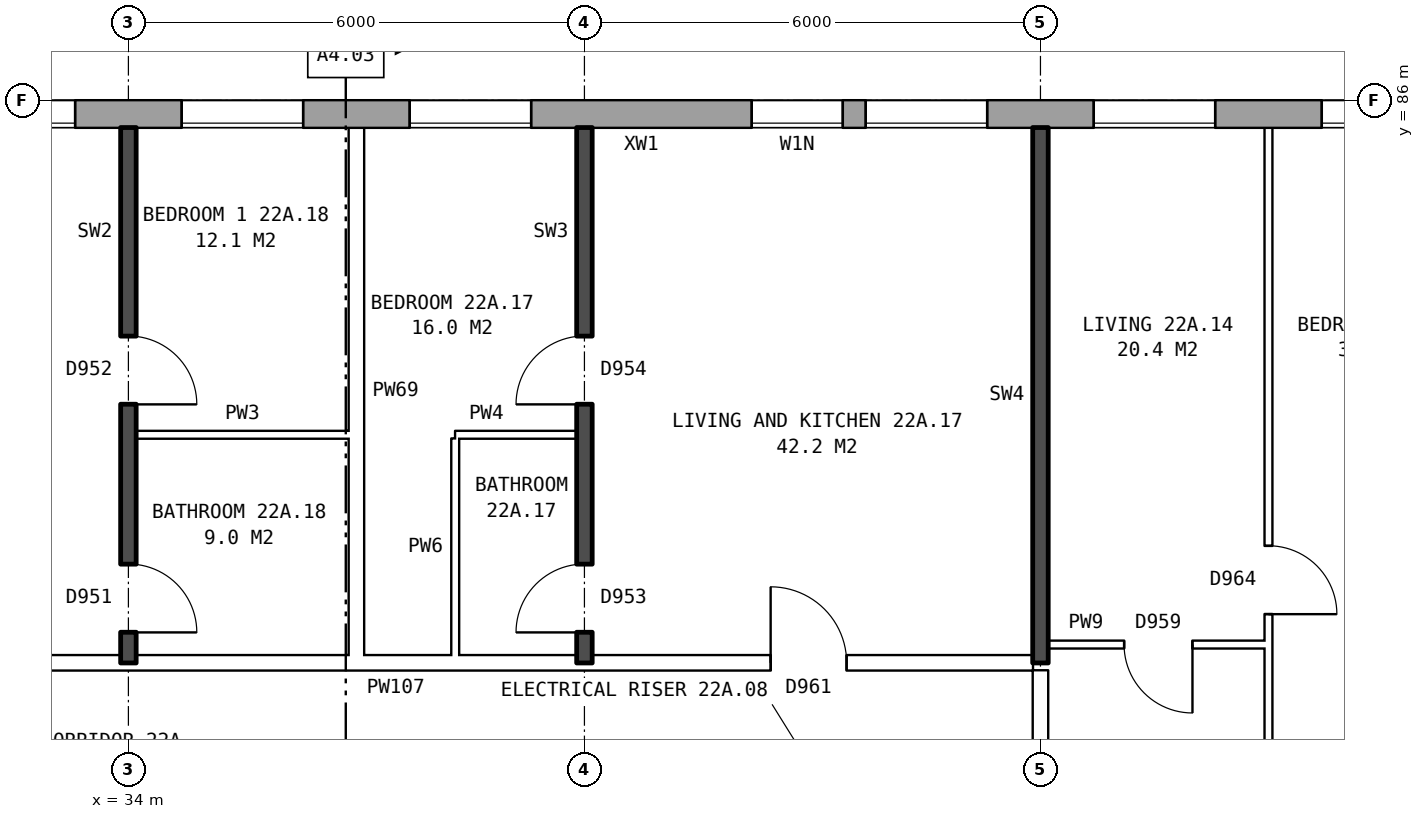
"""IFC4 building model, lengths in metres.
Left out: names, types, materials, properties, quantities, classifications, styles, units other than length and angle.
Written with IfcOpenShell. Run it as: python <this file> out.ifc"""

import sys

from ifc_helpers import new_model, si_unit, direction, frame, frame_2d, origin, place, context, subcontext, project, spatial, rectangle, extrude, element, fill, save


model = new_model("IFC4")
c1 = context("Model", 3, precision=1e-05, world=origin(), true_north=direction((0.0, 1.0)))
c2 = subcontext(c1, "Body", "Model", "MODEL_VIEW")
j1 = project(units=[si_unit("LENGTHUNIT", "METRE"), si_unit("PLANEANGLEUNIT", "RADIAN")], contexts=[c1])
p1 = place(None, origin())
s1 = spatial("IfcSite", under=j1, at=p1, CompositionType="ELEMENT")
p2 = place(p1, origin())
s2 = spatial("IfcBuilding", under=s1, at=p2, CompositionType="ELEMENT")
p3 = place(p2, frame((0.0, 0.0, 80.9)))
s3 = spatial("IfcBuildingStorey", under=s2, at=p3, CompositionType="ELEMENT", Elevation=80.9)
p4 = place(p3, frame((72.925, 85.82, 0.0), z_axis=(0.0, 0.0, 1.0), x_axis=(-1.0, 0.0, 0.0)))
e1 = element("IfcWall", 1, at=p4, inside=s3, PredefinedType="STANDARD", context=c2, shape_type="SweptSolid", body=[
    extrude(rectangle(XDim=46.601, YDim=0.36, at=frame_2d((23.3, 0.0))), origin(), (0.0, 0.0, 1.0), 2.85),
])
p5 = place(p4, frame((0.625, 0.0, 0.8)))
e2 = element("IfcOpeningElement", 2, at=p5, cuts=e1, PredefinedType="OPENING", context=c2, shape_type="SweptSolid", body=[
    extrude(rectangle(XDim=1.6, YDim=1.8, at=frame_2d((0.8, 0.9))), frame((0.0, 0.19, 0.0), z_axis=(0.0, -1.0, 0.0), x_axis=(1.0, 0.0, 0.0)), (0.0, 0.0, 1.0), 0.38),
])
p6 = place(p4, frame((3.625, 0.0, 0.8)))
e3 = element("IfcOpeningElement", 3, at=p6, cuts=e1, PredefinedType="OPENING", context=c2, shape_type="SweptSolid", body=[
    extrude(rectangle(XDim=1.6, YDim=1.8, at=frame_2d((0.8, 0.9))), frame((0.0, 0.19, 0.0), z_axis=(0.0, -1.0, 0.0), x_axis=(1.0, 0.0, 0.0)), (0.0, 0.0, 1.0), 0.38),
])
p7 = place(p4, frame((6.625, 0.0, 0.8)))
e4 = element("IfcOpeningElement", 4, at=p7, cuts=e1, PredefinedType="OPENING", context=c2, shape_type="SweptSolid", body=[
    extrude(rectangle(XDim=1.6, YDim=1.8, at=frame_2d((0.8, 0.9))), frame((0.0, 0.19, 0.0), z_axis=(0.0, -1.0, 0.0), x_axis=(1.0, 0.0, 0.0)), (0.0, 0.0, 1.0), 0.38),
])
p8 = place(p4, frame((9.625, 0.0, 0.8)))
e5 = element("IfcOpeningElement", 5, at=p8, cuts=e1, PredefinedType="OPENING", context=c2, shape_type="SweptSolid", body=[
    extrude(rectangle(XDim=1.6, YDim=1.8, at=frame_2d((0.8, 0.9))), frame((0.0, 0.19, 0.0), z_axis=(0.0, -1.0, 0.0), x_axis=(1.0, 0.0, 0.0)), (0.0, 0.0, 1.0), 0.38),
])
p9 = place(p4, frame((12.075, 0.0, 0.8)))
e6 = element("IfcOpeningElement", 6, at=p9, cuts=e1, PredefinedType="OPENING", context=c2, shape_type="SweptSolid", body=[
    extrude(rectangle(XDim=1.0, YDim=1.8, at=frame_2d((0.5, 0.9))), frame((0.0, 0.19, 0.0), z_axis=(0.0, -1.0, 0.0), x_axis=(1.0, 0.0, 0.0)), (0.0, 0.0, 1.0), 0.38),
])
p10 = place(p4, frame((15.325, 0.0, 0.65)))
e7 = element("IfcOpeningElement", 7, at=p10, cuts=e1, PredefinedType="OPENING", context=c2, shape_type="SweptSolid", body=[
    extrude(rectangle(XDim=0.6, YDim=0.9, at=frame_2d((0.3, 0.45))), frame((0.0, 0.19, 0.0), z_axis=(0.0, -1.0, 0.0), x_axis=(1.0, 0.0, 0.0)), (0.0, 0.0, 1.0), 0.38),
])
p11 = place(p4, frame((18.625, 0.0, 0.8)))
e8 = element("IfcOpeningElement", 8, at=p11, cuts=e1, PredefinedType="OPENING", context=c2, shape_type="SweptSolid", body=[
    extrude(rectangle(XDim=1.6, YDim=1.8, at=frame_2d((0.8, 0.9))), frame((0.0, 0.19, 0.0), z_axis=(0.0, -1.0, 0.0), x_axis=(1.0, 0.0, 0.0)), (0.0, 0.0, 1.0), 0.38),
])
p12 = place(p4, frame((21.625, 0.0, 0.8)))
e9 = element("IfcOpeningElement", 9, at=p12, cuts=e1, PredefinedType="OPENING", context=c2, shape_type="SweptSolid", body=[
    extrude(rectangle(XDim=1.6, YDim=1.8, at=frame_2d((0.8, 0.9))), frame((0.0, 0.19, 0.0), z_axis=(0.0, -1.0, 0.0), x_axis=(1.0, 0.0, 0.0)), (0.0, 0.0, 1.0), 0.38),
])
p13 = place(p4, frame((24.625, 0.0, 0.8)))
e10 = element("IfcOpeningElement", 10, at=p13, cuts=e1, PredefinedType="OPENING", context=c2, shape_type="SweptSolid", body=[
    extrude(rectangle(XDim=1.6, YDim=1.8, at=frame_2d((0.8, 0.9))), frame((0.0, 0.19, 0.0), z_axis=(0.0, -1.0, 0.0), x_axis=(1.0, 0.0, 0.0)), (0.0, 0.0, 1.0), 0.38),
])
p14 = place(p4, frame((27.625, 0.0, 0.8)))
e11 = element("IfcOpeningElement", 11, at=p14, cuts=e1, PredefinedType="OPENING", context=c2, shape_type="SweptSolid", body=[
    extrude(rectangle(XDim=1.6, YDim=1.8, at=frame_2d((0.8, 0.9))), frame((0.0, 0.19, 0.0), z_axis=(0.0, -1.0, 0.0), x_axis=(1.0, 0.0, 0.0)), (0.0, 0.0, 1.0), 0.38),
])
p15 = place(p4, frame((29.525, 0.0, 0.8)))
e12 = element("IfcOpeningElement", 12, at=p15, cuts=e1, PredefinedType="OPENING", context=c2, shape_type="SweptSolid", body=[
    extrude(rectangle(XDim=1.2, YDim=1.2, at=frame_2d((0.6, 0.6))), frame((0.0, 0.19, 0.0), z_axis=(0.0, -1.0, 0.0), x_axis=(1.0, 0.0, 0.0)), (0.0, 0.0, 1.0), 0.38),
])
p16 = place(p4, frame((33.625, 0.0, 0.8)))
e13 = element("IfcOpeningElement", 13, at=p16, cuts=e1, PredefinedType="OPENING", context=c2, shape_type="SweptSolid", body=[
    extrude(rectangle(XDim=1.6, YDim=1.8, at=frame_2d((0.8, 0.9))), frame((0.0, 0.19, 0.0), z_axis=(0.0, -1.0, 0.0), x_axis=(1.0, 0.0, 0.0)), (0.0, 0.0, 1.0), 0.38),
])
p17 = place(p4, frame((36.625, 0.0, 0.8)))
e14 = element("IfcOpeningElement", 14, at=p17, cuts=e1, PredefinedType="OPENING", context=c2, shape_type="SweptSolid", body=[
    extrude(rectangle(XDim=1.6, YDim=1.8, at=frame_2d((0.8, 0.9))), frame((0.0, 0.19, 0.0), z_axis=(0.0, -1.0, 0.0), x_axis=(1.0, 0.0, 0.0)), (0.0, 0.0, 1.0), 0.38),
])
p18 = place(p4, frame((39.625, 0.0, 0.8)))
e15 = element("IfcOpeningElement", 15, at=p18, cuts=e1, PredefinedType="OPENING", context=c2, shape_type="SweptSolid", body=[
    extrude(rectangle(XDim=1.6, YDim=1.8, at=frame_2d((0.8, 0.9))), frame((0.0, 0.19, 0.0), z_axis=(0.0, -1.0, 0.0), x_axis=(1.0, 0.0, 0.0)), (0.0, 0.0, 1.0), 0.38),
])
p19 = place(p4, frame((42.625, 0.0, 0.8)))
e16 = element("IfcOpeningElement", 16, at=p19, cuts=e1, PredefinedType="OPENING", context=c2, shape_type="SweptSolid", body=[
    extrude(rectangle(XDim=1.6, YDim=1.8, at=frame_2d((0.8, 0.9))), frame((0.0, 0.19, 0.0), z_axis=(0.0, -1.0, 0.0), x_axis=(1.0, 0.0, 0.0)), (0.0, 0.0, 1.0), 0.38),
])
p20 = place(p4, frame((13.375, 0.0, 1.7)))
e17 = element("IfcOpeningElement", 17, at=p20, cuts=e1, PredefinedType="OPENING", context=c2, shape_type="SweptSolid", body=[
    extrude(rectangle(XDim=0.8, YDim=0.9, at=frame_2d((0.4, 0.45))), frame((0.0, 0.19, 0.0), z_axis=(0.0, -1.0, 0.0), x_axis=(1.0, 0.0, 0.0)), (0.0, 0.0, 1.0), 0.38),
])
p21 = place(p4, frame((16.375, 0.0, 0.65)))
e18 = element("IfcOpeningElement", 18, at=p21, cuts=e1, PredefinedType="OPENING", context=c2, shape_type="SweptSolid", body=[
    extrude(rectangle(XDim=1.4, YDim=1.8, at=frame_2d((0.7, 0.9))), frame((0.0, 0.19, 0.0), z_axis=(0.0, -1.0, 0.0), x_axis=(1.0, 0.0, 0.0)), (0.0, 0.0, 1.0), 0.38),
])
p22 = place(p3, frame((23.61, 78.6, 0.0), z_axis=(0.0, 0.0, 1.0), x_axis=(1.0, 0.0, 0.0)))
e19 = element("IfcWall", 19, at=p22, inside=s3, PredefinedType="PARTITIONING", context=c2, shape_type="SweptSolid", body=[
    extrude(rectangle(XDim=22.29, YDim=0.2, at=frame_2d((11.145, 0.0))), origin(), (0.0, 0.0, 1.0), 2.85),
])
p23 = place(p22, frame((18.84, 0.0, 0.0)))
e20 = element("IfcOpeningElement", 20, at=p23, cuts=e19, PredefinedType="OPENING", context=c2, shape_type="SweptSolid", body=[
    extrude(rectangle(XDim=1.0, YDim=2.1, at=frame_2d((0.5, 1.05))), frame((0.0, 0.11, 0.0), z_axis=(0.0, -1.0, 0.0), x_axis=(1.0, 0.0, 0.0)), (0.0, 0.0, 1.0), 0.22),
])
p24 = place(p22, frame((6.89, 0.0, 0.0)))
e21 = element("IfcOpeningElement", 21, at=p24, cuts=e19, PredefinedType="OPENING", context=c2, shape_type="SweptSolid", body=[
    extrude(rectangle(XDim=1.0, YDim=2.1, at=frame_2d((0.5, 1.05))), frame((0.0, 0.11, 0.0), z_axis=(0.0, -1.0, 0.0), x_axis=(1.0, 0.0, 0.0)), (0.0, 0.0, 1.0), 0.22),
])
p25 = place(p3, frame((46.1, 78.84, 0.0), z_axis=(0.0, 0.0, 1.0), x_axis=(1.0, 0.0, 0.0)))
e22 = element("IfcWall", 22, at=p25, inside=s3, PredefinedType="PARTITIONING", context=c2, shape_type="SweptSolid", body=[
    extrude(rectangle(XDim=2.9, YDim=0.1, at=frame_2d((1.45, 0.0))), origin(), (0.0, 0.0, 1.0), 2.85),
])
p26 = place(p25, frame((1.0, 0.0, 0.0)))
e23 = element("IfcOpeningElement", 23, at=p26, cuts=e22, PredefinedType="OPENING", context=c2, shape_type="SweptSolid", body=[
    extrude(rectangle(XDim=0.9, YDim=2.1, at=frame_2d((0.45, 1.05))), frame((0.0, 0.06, 0.0), z_axis=(0.0, -1.0, 0.0), x_axis=(1.0, 0.0, 0.0)), (0.0, 0.0, 1.0), 0.12),
])
p27 = place(p3, frame((34.1, 81.6, 0.0), z_axis=(0.0, 0.0, 1.0), x_axis=(1.0, 0.0, 0.0)))
e24 = element("IfcWall", 24, at=p27, inside=s3, PredefinedType="PARTITIONING", context=c2, shape_type="SweptSolid", body=[
    extrude(rectangle(XDim=2.8, YDim=0.1, at=frame_2d((1.4, 0.0))), origin(), (0.0, 0.0, 1.0), 2.85),
])
p28 = place(p3, frame((38.3, 81.6, 0.0), z_axis=(0.0, 0.0, 1.0), x_axis=(1.0, 0.0, 0.0)))
e25 = element("IfcWall", 25, at=p28, inside=s3, PredefinedType="PARTITIONING", context=c2, shape_type="SweptSolid", body=[
    extrude(rectangle(XDim=1.6, YDim=0.1, at=frame_2d((0.8, 0.0))), origin(), (0.0, 0.0, 1.0), 2.85),
])
p29 = place(p3, frame((34.0, 78.6, 0.0), z_axis=(0.0, 0.0, 1.0), x_axis=(0.0, 1.0, 0.0)))
e26 = element("IfcWall", 26, at=p29, inside=s3, PredefinedType="SOLIDWALL", context=c2, shape_type="SweptSolid", body=[
    extrude(rectangle(XDim=7.04, YDim=0.2, at=frame_2d((3.52, 0.0))), origin(), (0.0, 0.0, 1.0), 2.85),
])
p30 = place(p29, frame((3.4, 0.0, 0.0)))
e27 = element("IfcOpeningElement", 27, at=p30, cuts=e26, PredefinedType="OPENING", context=c2, shape_type="SweptSolid", body=[
    extrude(rectangle(XDim=0.9, YDim=2.1, at=frame_2d((0.45, 1.05))), frame((0.0, 0.11, 0.0), z_axis=(0.0, -1.0, 0.0), x_axis=(1.0, 0.0, 0.0)), (0.0, 0.0, 1.0), 0.22),
])
p31 = place(p29, frame((0.4, 0.0, 0.0)))
e28 = element("IfcOpeningElement", 28, at=p31, cuts=e26, PredefinedType="OPENING", context=c2, shape_type="SweptSolid", body=[
    extrude(rectangle(XDim=0.9, YDim=2.1, at=frame_2d((0.45, 1.05))), frame((0.0, 0.11, 0.0), z_axis=(0.0, -1.0, 0.0), x_axis=(1.0, 0.0, 0.0)), (0.0, 0.0, 1.0), 0.22),
])
p32 = place(p3, frame((37.0, 78.7, 0.0), z_axis=(0.0, 0.0, 1.0), x_axis=(0.0, 1.0, 0.0)))
e29 = element("IfcWall", 29, at=p32, inside=s3, PredefinedType="PARTITIONING", context=c2, shape_type="SweptSolid", body=[
    extrude(rectangle(XDim=6.94, YDim=0.2, at=frame_2d((3.47, 0.0))), origin(), (0.0, 0.0, 1.0), 2.85),
])
p33 = place(p3, frame((38.3, 78.7, 0.0), z_axis=(0.0, 0.0, 1.0), x_axis=(0.0, 1.0, 0.0)))
e30 = element("IfcWall", 30, at=p33, inside=s3, PredefinedType="PARTITIONING", context=c2, shape_type="SweptSolid", body=[
    extrude(rectangle(XDim=2.85, YDim=0.1, at=frame_2d((1.425, 0.0))), origin(), (0.0, 0.0, 1.0), 2.85),
])
p34 = place(p3, frame((40.0, 78.6, 0.0), z_axis=(0.0, 0.0, 1.0), x_axis=(0.0, 1.0, 0.0)))
e31 = element("IfcWall", 31, at=p34, inside=s3, PredefinedType="SOLIDWALL", context=c2, shape_type="SweptSolid", body=[
    extrude(rectangle(XDim=7.04, YDim=0.2, at=frame_2d((3.52, 0.0))), origin(), (0.0, 0.0, 1.0), 2.85),
])
p35 = place(p34, frame((3.4, 0.0, 0.0)))
e32 = element("IfcOpeningElement", 32, at=p35, cuts=e31, PredefinedType="OPENING", context=c2, shape_type="SweptSolid", body=[
    extrude(rectangle(XDim=0.9, YDim=2.1, at=frame_2d((0.45, 1.05))), frame((0.0, 0.11, 0.0), z_axis=(0.0, -1.0, 0.0), x_axis=(1.0, 0.0, 0.0)), (0.0, 0.0, 1.0), 0.22),
])
p36 = place(p34, frame((0.4, 0.0, 0.0)))
e33 = element("IfcOpeningElement", 33, at=p36, cuts=e31, PredefinedType="OPENING", context=c2, shape_type="SweptSolid", body=[
    extrude(rectangle(XDim=0.9, YDim=2.1, at=frame_2d((0.45, 1.05))), frame((0.0, 0.11, 0.0), z_axis=(0.0, -1.0, 0.0), x_axis=(1.0, 0.0, 0.0)), (0.0, 0.0, 1.0), 0.22),
])
p37 = place(p3, frame((46.0, 76.3, 0.0), z_axis=(0.0, 0.0, 1.0), x_axis=(0.0, 1.0, 0.0)))
e34 = element("IfcWall", 34, at=p37, inside=s3, PredefinedType="PARTITIONING", context=c2, shape_type="SweptSolid", body=[
    extrude(rectangle(XDim=2.2, YDim=0.2, at=frame_2d((1.1, 0.0))), origin(), (0.0, 0.0, 1.0), 2.85),
])
p38 = place(p3, frame((46.0, 78.6, 0.0), z_axis=(0.0, 0.0, 1.0), x_axis=(0.0, 1.0, 0.0)))
e35 = element("IfcWall", 35, at=p38, inside=s3, PredefinedType="SOLIDWALL", context=c2, shape_type="SweptSolid", body=[
    extrude(rectangle(XDim=7.04, YDim=0.2, at=frame_2d((3.52, 0.0))), origin(), (0.0, 0.0, 1.0), 2.85),
])
p39 = place(p3, frame((49.0, 71.3, 0.0), z_axis=(0.0, 0.0, 1.0), x_axis=(0.0, 1.0, 0.0)))
e36 = element("IfcWall", 36, at=p39, inside=s3, PredefinedType="PARTITIONING", context=c2, shape_type="SweptSolid", body=[
    extrude(rectangle(XDim=14.34, YDim=0.1, at=frame_2d((7.17, 0.0))), origin(), (0.0, 0.0, 1.0), 2.85),
])
p40 = place(p39, frame((7.94, 0.0, 0.0)))
e37 = element("IfcOpeningElement", 37, at=p40, cuts=e36, PredefinedType="OPENING", context=c2, shape_type="SweptSolid", body=[
    extrude(rectangle(XDim=0.9, YDim=2.1, at=frame_2d((0.45, 1.05))), frame((0.0, 0.06, 0.0), z_axis=(0.0, -1.0, 0.0), x_axis=(1.0, 0.0, 0.0)), (0.0, 0.0, 1.0), 0.12),
])
p41 = place(p39, frame((0.4, 0.0, 0.0)))
e38 = element("IfcOpeningElement", 38, at=p41, cuts=e36, PredefinedType="OPENING", context=c2, shape_type="SweptSolid", body=[
    extrude(rectangle(XDim=0.9, YDim=2.1, at=frame_2d((0.45, 1.05))), frame((0.0, 0.06, 0.0), z_axis=(0.0, -1.0, 0.0), x_axis=(1.0, 0.0, 0.0)), (0.0, 0.0, 1.0), 0.12),
])
p42 = place(p12, origin())
e39 = element("IfcWindow", 39, at=p42, inside=s3, PartitioningType="SINGLE_PANEL", PredefinedType="WINDOW", context=c2, shape_type="SweptSolid", body=[
    extrude(rectangle(XDim=1.6, YDim=1.8, at=frame_2d((0.8, 0.9))), frame((0.0, 0.15, 0.0), z_axis=(0.0, -1.0, 0.0), x_axis=(1.0, 0.0, 0.0)), (0.0, 0.0, 1.0), 0.06),
])
fill(e9, e39)
p43 = place(p13, origin())
e40 = element("IfcWindow", 40, at=p43, inside=s3, PartitioningType="SINGLE_PANEL", PredefinedType="WINDOW", context=c2, shape_type="SweptSolid", body=[
    extrude(rectangle(XDim=1.6, YDim=1.8, at=frame_2d((0.8, 0.9))), frame((0.0, 0.15, 0.0), z_axis=(0.0, -1.0, 0.0), x_axis=(1.0, 0.0, 0.0)), (0.0, 0.0, 1.0), 0.06),
])
fill(e10, e40)
p44 = place(p14, origin())
e41 = element("IfcWindow", 41, at=p44, inside=s3, PartitioningType="SINGLE_PANEL", PredefinedType="WINDOW", context=c2, shape_type="SweptSolid", body=[
    extrude(rectangle(XDim=1.6, YDim=1.8, at=frame_2d((0.8, 0.9))), frame((0.0, 0.15, 0.0), z_axis=(0.0, -1.0, 0.0), x_axis=(1.0, 0.0, 0.0)), (0.0, 0.0, 1.0), 0.06),
])
fill(e11, e41)
p45 = place(p15, origin())
e42 = element("IfcWindow", 42, at=p45, inside=s3, PartitioningType="SINGLE_PANEL", PredefinedType="WINDOW", context=c2, shape_type="SweptSolid", body=[
    extrude(rectangle(XDim=1.2, YDim=1.2, at=frame_2d((0.6, 0.6))), frame((0.0, 0.15, 0.0), z_axis=(0.0, -1.0, 0.0), x_axis=(1.0, 0.0, 0.0)), (0.0, 0.0, 1.0), 0.06),
])
fill(e12, e42)
p46 = place(p16, origin())
e43 = element("IfcWindow", 43, at=p46, inside=s3, PartitioningType="SINGLE_PANEL", PredefinedType="WINDOW", context=c2, shape_type="SweptSolid", body=[
    extrude(rectangle(XDim=1.6, YDim=1.8, at=frame_2d((0.8, 0.9))), frame((0.0, 0.15, 0.0), z_axis=(0.0, -1.0, 0.0), x_axis=(1.0, 0.0, 0.0)), (0.0, 0.0, 1.0), 0.06),
])
fill(e13, e43)
p47 = place(p17, origin())
e44 = element("IfcWindow", 44, at=p47, inside=s3, PartitioningType="SINGLE_PANEL", PredefinedType="WINDOW", context=c2, shape_type="SweptSolid", body=[
    extrude(rectangle(XDim=1.6, YDim=1.8, at=frame_2d((0.8, 0.9))), frame((0.0, 0.15, 0.0), z_axis=(0.0, -1.0, 0.0), x_axis=(1.0, 0.0, 0.0)), (0.0, 0.0, 1.0), 0.06),
])
fill(e14, e44)
p48 = place(p18, origin())
e45 = element("IfcWindow", 45, at=p48, inside=s3, PartitioningType="SINGLE_PANEL", PredefinedType="WINDOW", context=c2, shape_type="SweptSolid", body=[
    extrude(rectangle(XDim=1.6, YDim=1.8, at=frame_2d((0.8, 0.9))), frame((0.0, 0.15, 0.0), z_axis=(0.0, -1.0, 0.0), x_axis=(1.0, 0.0, 0.0)), (0.0, 0.0, 1.0), 0.06),
])
fill(e15, e45)
p49 = place(p40, frame((0.9, 0.0, 0.0), z_axis=(0.0, 0.0, 1.0), x_axis=(-1.0, 0.0, 0.0)))
e46 = element("IfcDoor", 46, at=p49, inside=s3, OperationType="SINGLE_SWING_RIGHT", PredefinedType="DOOR", context=c2, shape_type="SweptSolid", body=[
    extrude(rectangle(XDim=0.9, YDim=2.1, at=frame_2d((0.45, 1.05))), frame((0.0, 0.025, 0.0), z_axis=(0.0, -1.0, 0.0), x_axis=(1.0, 0.0, 0.0)), (0.0, 0.0, 1.0), 0.05),
])
fill(e37, e46)
p50 = place(p26, frame((0.9, 0.0, 0.0), z_axis=(0.0, 0.0, 1.0), x_axis=(-1.0, 0.0, 0.0)))
e47 = element("IfcDoor", 47, at=p50, inside=s3, OperationType="SINGLE_SWING_LEFT", PredefinedType="DOOR", context=c2, shape_type="SweptSolid", body=[
    extrude(rectangle(XDim=0.9, YDim=2.1, at=frame_2d((0.45, 1.05))), frame((0.0, 0.025, 0.0), z_axis=(0.0, -1.0, 0.0), x_axis=(1.0, 0.0, 0.0)), (0.0, 0.0, 1.0), 0.05),
])
fill(e23, e47)
p51 = place(p35, origin())
e48 = element("IfcDoor", 48, at=p51, inside=s3, OperationType="SINGLE_SWING_LEFT", PredefinedType="DOOR", context=c2, shape_type="SweptSolid", body=[
    extrude(rectangle(XDim=0.9, YDim=2.1, at=frame_2d((0.45, 1.05))), frame((0.0, 0.025, 0.0), z_axis=(0.0, -1.0, 0.0), x_axis=(1.0, 0.0, 0.0)), (0.0, 0.0, 1.0), 0.05),
])
fill(e32, e48)
p52 = place(p23, origin())
e49 = element("IfcDoor", 49, at=p52, inside=s3, OperationType="SINGLE_SWING_LEFT", PredefinedType="DOOR", context=c2, shape_type="SweptSolid", body=[
    extrude(rectangle(XDim=1.0, YDim=2.1, at=frame_2d((0.5, 1.05))), frame((0.0, 0.025, 0.0), z_axis=(0.0, -1.0, 0.0), x_axis=(1.0, 0.0, 0.0)), (0.0, 0.0, 1.0), 0.05),
])
fill(e20, e49)
p53 = place(p36, origin())
e50 = element("IfcDoor", 50, at=p53, inside=s3, OperationType="SINGLE_SWING_LEFT", PredefinedType="DOOR", context=c2, shape_type="SweptSolid", body=[
    extrude(rectangle(XDim=0.9, YDim=2.1, at=frame_2d((0.45, 1.05))), frame((0.0, 0.025, 0.0), z_axis=(0.0, -1.0, 0.0), x_axis=(1.0, 0.0, 0.0)), (0.0, 0.0, 1.0), 0.05),
])
fill(e33, e50)
p54 = place(p30, frame((0.9, 0.0, 0.0), z_axis=(0.0, 0.0, 1.0), x_axis=(-1.0, 0.0, 0.0)))
e51 = element("IfcDoor", 51, at=p54, inside=s3, OperationType="SINGLE_SWING_RIGHT", PredefinedType="DOOR", context=c2, shape_type="SweptSolid", body=[
    extrude(rectangle(XDim=0.9, YDim=2.1, at=frame_2d((0.45, 1.05))), frame((0.0, 0.025, 0.0), z_axis=(0.0, -1.0, 0.0), x_axis=(1.0, 0.0, 0.0)), (0.0, 0.0, 1.0), 0.05),
])
fill(e27, e51)
p55 = place(p31, frame((0.9, 0.0, 0.0), z_axis=(0.0, 0.0, 1.0), x_axis=(-1.0, 0.0, 0.0)))
e52 = element("IfcDoor", 52, at=p55, inside=s3, OperationType="SINGLE_SWING_RIGHT", PredefinedType="DOOR", context=c2, shape_type="SweptSolid", body=[
    extrude(rectangle(XDim=0.9, YDim=2.1, at=frame_2d((0.45, 1.05))), frame((0.0, 0.025, 0.0), z_axis=(0.0, -1.0, 0.0), x_axis=(1.0, 0.0, 0.0)), (0.0, 0.0, 1.0), 0.05),
])
fill(e28, e52)
save(model, sys.argv[1])
